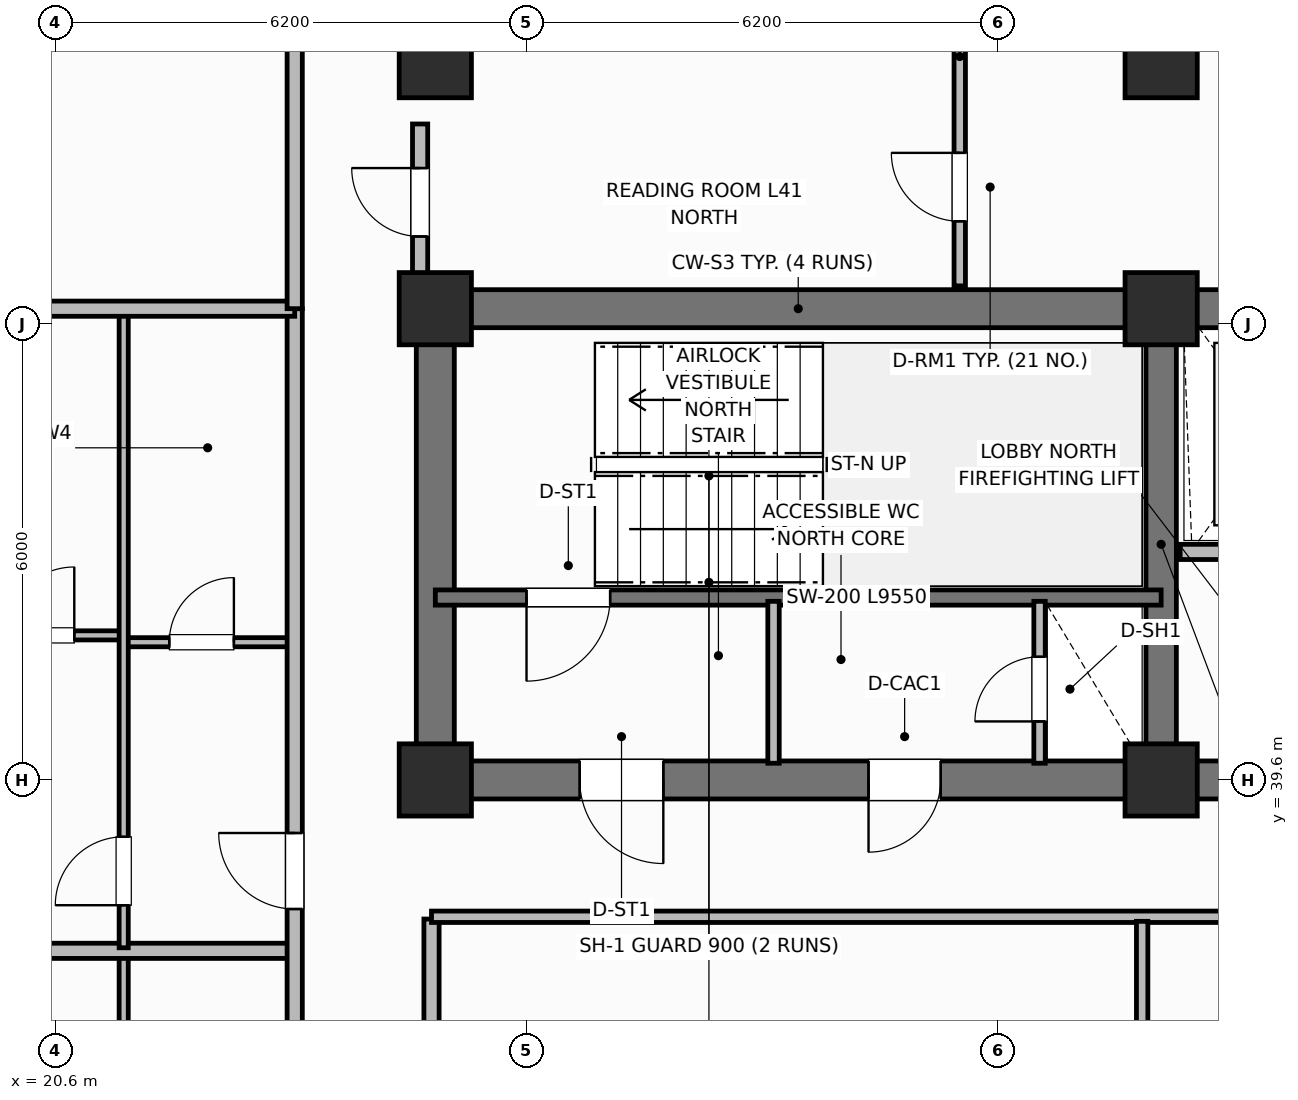
"""IFC4 building model, lengths in metres.
Left out: names, types, materials, properties, quantities, classifications, styles, units other than length and angle.
Written with IfcOpenShell. Run it as: python <this file> out.ifc"""

import sys

from ifc_helpers import new_model, si_unit, direction, frame, frame_2d, origin, origin_2d, place, context, subcontext, project, spatial, rectangle, extrude, element, fill, save


model = new_model("IFC4")
c1 = context("Model", 3, precision=1e-05, world=origin(), true_north=direction((0.0, 1.0)))
c2 = subcontext(c1, "Body", "Model", "MODEL_VIEW")
j1 = project(units=[si_unit("LENGTHUNIT", "METRE"), si_unit("PLANEANGLEUNIT", "RADIAN")], contexts=[c1])
p1 = place(None, origin())
s1 = spatial("IfcSite", under=j1, at=p1, CompositionType="ELEMENT")
p2 = place(p1, origin())
s2 = spatial("IfcBuilding", under=s1, at=p2, CompositionType="ELEMENT")
p3 = place(p2, frame((0.0, 0.0, 166.3)))
s3 = spatial("IfcBuildingStorey", under=s2, at=p3, CompositionType="ELEMENT", Elevation=166.3)
p4 = place(p3, frame((25.6, 45.8, 0.0), z_axis=(0.0, 0.0, 1.0), x_axis=(1.0, 0.0, 0.0)))
e1 = element("IfcWall", 1, at=p4, inside=s3, PredefinedType="SHEAR", context=c2, shape_type="SweptSolid", body=[
    extrude(rectangle(XDim=27.2, YDim=0.5, at=frame_2d((13.6, 0.0))), origin(), (0.0, 0.0, 1.0), 3.7),
])
p5 = place(p3, frame((25.6, 39.85, 0.0), z_axis=(0.0, 0.0, 1.0), x_axis=(0.0, 1.0, 0.0)))
e2 = element("IfcWall", 2, at=p5, inside=s3, PredefinedType="SHEAR", context=c2, shape_type="SweptSolid", body=[
    extrude(rectangle(XDim=5.7, YDim=0.5, at=frame_2d((2.85, 0.0))), origin(), (0.0, 0.0, 1.0), 3.7),
])
p6 = place(p3, frame((52.8, 39.6, 0.0), z_axis=(0.0, 0.0, 1.0), x_axis=(-1.0, 0.0, 0.0)))
e3 = element("IfcWall", 3, at=p6, inside=s3, PredefinedType="SHEAR", context=c2, shape_type="SweptSolid", body=[
    extrude(rectangle(XDim=27.2, YDim=0.5, at=frame_2d((13.6, 0.0))), origin(), (0.0, 0.0, 1.0), 3.7),
])
p7 = place(p6, frame((24.2, 0.0, 0.0)))
e4 = element("IfcOpeningElement", 4, at=p7, cuts=e3, PredefinedType="OPENING", context=c2, shape_type="SweptSolid", body=[
    extrude(rectangle(XDim=1.1, YDim=2.15, at=frame_2d((0.55, 1.075))), frame((0.0, 0.26, 0.0), z_axis=(0.0, -1.0, 0.0), x_axis=(1.0, 0.0, 0.0)), (0.0, 0.0, 1.0), 0.52),
])
p8 = place(p6, frame((20.55, 0.0, 0.0)))
e5 = element("IfcOpeningElement", 5, at=p8, cuts=e3, PredefinedType="OPENING", context=c2, shape_type="SweptSolid", body=[
    extrude(rectangle(XDim=0.95, YDim=2.1, at=frame_2d((0.475, 1.05))), frame((0.0, 0.26, 0.0), z_axis=(0.0, -1.0, 0.0), x_axis=(1.0, 0.0, 0.0)), (0.0, 0.0, 1.0), 0.52),
])
p9 = place(p6, frame((15.1, 0.0, 0.0)))
e6 = element("IfcOpeningElement", 6, at=p9, cuts=e3, PredefinedType="OPENING", context=c2, shape_type="SweptSolid", body=[
    extrude(rectangle(XDim=1.2, YDim=2.15, at=frame_2d((0.6, 1.075))), frame((0.0, 0.26, 0.0), z_axis=(0.0, -1.0, 0.0), x_axis=(1.0, 0.0, 0.0)), (0.0, 0.0, 1.0), 0.52),
])
p10 = place(p6, frame((13.05, 0.0, 0.0)))
e7 = element("IfcOpeningElement", 7, at=p10, cuts=e3, PredefinedType="OPENING", context=c2, shape_type="SweptSolid", body=[
    extrude(rectangle(XDim=0.85, YDim=2.1, at=frame_2d((0.425, 1.05))), frame((0.0, 0.26, 0.0), z_axis=(0.0, -1.0, 0.0), x_axis=(1.0, 0.0, 0.0)), (0.0, 0.0, 1.0), 0.52),
])
p11 = place(p6, frame((11.0, 0.0, 0.0)))
e8 = element("IfcOpeningElement", 8, at=p11, cuts=e3, PredefinedType="OPENING", context=c2, shape_type="SweptSolid", body=[
    extrude(rectangle(XDim=0.85, YDim=2.1, at=frame_2d((0.425, 1.05))), frame((0.0, 0.26, 0.0), z_axis=(0.0, -1.0, 0.0), x_axis=(1.0, 0.0, 0.0)), (0.0, 0.0, 1.0), 0.52),
])
p12 = place(p6, frame((7.35, 0.0, 0.0)))
e9 = element("IfcOpeningElement", 9, at=p12, cuts=e3, PredefinedType="OPENING", context=c2, shape_type="SweptSolid", body=[
    extrude(rectangle(XDim=0.85, YDim=2.1, at=frame_2d((0.425, 1.05))), frame((0.0, 0.26, 0.0), z_axis=(0.0, -1.0, 0.0), x_axis=(1.0, 0.0, 0.0)), (0.0, 0.0, 1.0), 0.52),
])
p13 = place(p6, frame((4.8, 0.0, 0.0)))
e10 = element("IfcOpeningElement", 10, at=p13, cuts=e3, PredefinedType="OPENING", context=c2, shape_type="SweptSolid", body=[
    extrude(rectangle(XDim=0.85, YDim=2.1, at=frame_2d((0.425, 1.05))), frame((0.0, 0.26, 0.0), z_axis=(0.0, -1.0, 0.0), x_axis=(1.0, 0.0, 0.0)), (0.0, 0.0, 1.0), 0.52),
])
p14 = place(p6, frame((1.9, 0.0, 0.0)))
e11 = element("IfcOpeningElement", 11, at=p14, cuts=e3, PredefinedType="OPENING", context=c2, shape_type="SweptSolid", body=[
    extrude(rectangle(XDim=0.85, YDim=2.1, at=frame_2d((0.425, 1.05))), frame((0.0, 0.26, 0.0), z_axis=(0.0, -1.0, 0.0), x_axis=(1.0, 0.0, 0.0)), (0.0, 0.0, 1.0), 0.52),
])
p15 = place(p3, frame((35.15, 39.85, 0.0), z_axis=(0.0, 0.0, 1.0), x_axis=(0.0, 1.0, 0.0)))
e12 = element("IfcWall", 12, at=p15, inside=s3, PredefinedType="SHEAR", context=c2, shape_type="SweptSolid", body=[
    extrude(rectangle(XDim=5.7, YDim=0.4, at=frame_2d((2.85, 0.0))), origin(), (0.0, 0.0, 1.0), 3.7),
])
for number, where, z_axis, x_axis in (
    (13, (25.6, 39.6, 0.0), (0.0, 0.0, 1.0), (1.0, 0.0, 0.0)),
    (14, (25.6, 45.8, 0.0), (0.0, 0.0, 1.0), (1.0, 0.0, 0.0)),
    (15, (35.15, 39.6, 0.0), (0.0, 0.0, 1.0), (1.0, 0.0, 0.0)),
    (16, (35.15, 45.8, 0.0), (0.0, 0.0, 1.0), (1.0, 0.0, 0.0)),
    (17, (25.6, 49.05, 0.0), (0.0, 0.0, 1.0), (1.0, 0.0, 0.0)),
    (18, (35.15, 49.05, 0.0), (0.0, 0.0, 1.0), (1.0, 0.0, 0.0)),
):
    element("IfcColumn", number, at=place(p3, frame(where, z_axis=z_axis, x_axis=x_axis)), inside=s3, PredefinedType="COLUMN", context=c2, shape_type="SweptSolid", body=[
        extrude(rectangle(XDim=0.95, YDim=0.95, at=origin_2d()), origin(), (0.0, 0.0, 1.0), 3.7),
    ])
p16 = place(p3, frame((35.15, 42.0, 0.0), z_axis=(0.0, 0.0, 1.0), x_axis=(-1.0, 0.0, 0.0)))
e19 = element("IfcWall", 19, at=p16, inside=s3, PredefinedType="SHEAR", context=c2, shape_type="SweptSolid", body=[
    extrude(rectangle(XDim=9.55, YDim=0.2, at=frame_2d((4.775, 0.0))), origin(), (0.0, 0.0, 1.0), 3.7),
])
p17 = place(p16, frame((7.25, 0.0, 0.0)))
e20 = element("IfcOpeningElement", 20, at=p17, cuts=e19, PredefinedType="OPENING", context=c2, shape_type="SweptSolid", body=[
    extrude(rectangle(XDim=1.1, YDim=2.15, at=frame_2d((0.55, 1.075))), frame((0.0, 0.11, 0.0), z_axis=(0.0, -1.0, 0.0), x_axis=(1.0, 0.0, 0.0)), (0.0, 0.0, 1.0), 0.22),
])
p18 = place(p3, frame((33.55, 39.82, 0.0), z_axis=(0.0, 0.0, 1.0), x_axis=(0.0, 1.0, 0.0)))
e21 = element("IfcWall", 21, at=p18, inside=s3, PredefinedType="PARTITIONING", context=c2, shape_type="SweptSolid", body=[
    extrude(rectangle(XDim=2.13, YDim=0.15, at=frame_2d((1.065, 0.0))), origin(), (0.0, 0.0, 1.0), 2.55),
])
p19 = place(p18, frame((0.55, 0.0, 0.0)))
e22 = element("IfcOpeningElement", 22, at=p19, cuts=e21, PredefinedType="OPENING", context=c2, shape_type="SweptSolid", body=[
    extrude(rectangle(XDim=0.85, YDim=2.05, at=frame_2d((0.425, 1.025))), frame((0.0, 0.085, 0.0), z_axis=(0.0, -1.0, 0.0), x_axis=(1.0, 0.0, 0.0)), (0.0, 0.0, 1.0), 0.17),
])
p20 = place(p3, frame((30.05, 39.82, 0.0), z_axis=(0.0, 0.0, 1.0), x_axis=(0.0, 1.0, 0.0)))
e23 = element("IfcWall", 23, at=p20, inside=s3, PredefinedType="PARTITIONING", context=c2, shape_type="SweptSolid", body=[
    extrude(rectangle(XDim=2.13, YDim=0.15, at=frame_2d((1.065, 0.0))), origin(), (0.0, 0.0, 1.0), 2.55),
])
p21 = place(p3, frame((37.95, 42.6, 0.0), z_axis=(0.0, 0.0, 1.0), x_axis=(-1.0, 0.0, 0.0)))
e24 = element("IfcWall", 24, at=p21, inside=s3, PredefinedType="PARTITIONING", context=c2, shape_type="SweptSolid", body=[
    extrude(rectangle(XDim=2.55, YDim=0.2, at=frame_2d((1.275, 0.0))), origin(), (0.0, 0.0, 1.0), 2.32),
])
p22 = place(p21, frame((0.75, 0.0, 0.0)))
e25 = element("IfcOpeningElement", 25, at=p22, cuts=e24, PredefinedType="OPENING", context=c2, shape_type="SweptSolid", body=[
    extrude(rectangle(XDim=1.1, YDim=2.15, at=frame_2d((0.55, 1.075))), frame((0.0, 0.11, 0.0), z_axis=(0.0, -1.0, 0.0), x_axis=(1.0, 0.0, 0.0)), (0.0, 0.0, 1.0), 0.22),
])
p23 = place(p3, frame((25.55, 18.63, 0.0), z_axis=(0.0, 0.0, 1.0), x_axis=(0.0, 1.0, 0.0)))
e26 = element("IfcWall", 26, at=p23, inside=s3, PredefinedType="PARTITIONING", context=c2, shape_type="SweptSolid", body=[
    extrude(rectangle(XDim=19.14, YDim=0.2, at=frame_2d((9.57, 0.0))), origin(), (0.0, 0.0, 1.0), 2.55),
])
p24 = place(p3, frame((25.55, 37.8, 0.0), z_axis=(0.0, 0.0, 1.0), x_axis=(1.0, 0.0, 0.0)))
e27 = element("IfcWall", 27, at=p24, inside=s3, PredefinedType="PARTITIONING", context=c2, shape_type="SweptSolid", body=[
    extrude(rectangle(XDim=22.2, YDim=0.15, at=frame_2d((11.1, 0.0))), origin(), (0.0, 0.0, 1.0), 2.55),
])
p25 = place(p3, frame((34.9, 18.66, 0.0), z_axis=(0.0, 0.0, 1.0), x_axis=(0.0, 1.0, 0.0)))
e28 = element("IfcWall", 28, at=p25, inside=s3, PredefinedType="PARTITIONING", context=c2, shape_type="SweptSolid", body=[
    extrude(rectangle(XDim=19.08, YDim=0.15, at=frame_2d((9.54, 0.0))), origin(), (0.0, 0.0, 1.0), 2.55),
])
p26 = place(p25, frame((5.0, 0.0, 0.0)))
e29 = element("IfcOpeningElement", 29, at=p26, cuts=e28, PredefinedType="OPENING", context=c2, shape_type="SweptSolid", body=[
    extrude(rectangle(XDim=1.0, YDim=2.15, at=frame_2d((0.5, 1.075))), frame((0.0, 0.085, 0.0), z_axis=(0.0, -1.0, 0.0), x_axis=(1.0, 0.0, 0.0)), (0.0, 0.0, 1.0), 0.17),
])
p27 = place(p3, frame((21.5, 29.84, 0.0), z_axis=(0.0, 0.0, 1.0), x_axis=(0.0, 1.0, 0.0)))
e30 = element("IfcWall", 30, at=p27, inside=s3, PredefinedType="PARTITIONING", context=c2, shape_type="SweptSolid", body=[
    extrude(rectangle(XDim=7.472, YDim=0.12, at=frame_2d((3.736, 0.0))), origin(), (0.0, 0.0, 1.0), 2.55),
])
p28 = place(p27, frame((0.61, 0.0, 0.0)))
e31 = element("IfcOpeningElement", 31, at=p28, cuts=e30, PredefinedType="OPENING", context=c2, shape_type="SweptSolid", body=[
    extrude(rectangle(XDim=0.9, YDim=2.1, at=frame_2d((0.45, 1.05))), frame((0.0, 0.07, 0.0), z_axis=(0.0, -1.0, 0.0), x_axis=(1.0, 0.0, 0.0)), (0.0, 0.0, 1.0), 0.14),
])
p29 = place(p3, frame((16.57, 37.352, 0.0), z_axis=(0.0, 0.0, 1.0), x_axis=(1.0, 0.0, 0.0)))
e32 = element("IfcWall", 32, at=p29, inside=s3, PredefinedType="PARTITIONING", context=c2, shape_type="SweptSolid", body=[
    extrude(rectangle(XDim=7.18, YDim=0.2, at=frame_2d((3.59, 0.0))), origin(), (0.0, 0.0, 1.0), 2.55),
])
p30 = place(p3, frame((21.5, 41.412, 0.0), z_axis=(0.0, 0.0, 1.0), x_axis=(1.0, 0.0, 0.0)))
e33 = element("IfcWall", 33, at=p30, inside=s3, PredefinedType="PARTITIONING", context=c2, shape_type="SweptSolid", body=[
    extrude(rectangle(XDim=2.25, YDim=0.12, at=frame_2d((1.125, 0.0))), origin(), (0.0, 0.0, 1.0), 2.55),
])
p31 = place(p30, frame((0.6, 0.0, 0.0)))
e34 = element("IfcOpeningElement", 34, at=p31, cuts=e33, PredefinedType="OPENING", context=c2, shape_type="SweptSolid", body=[
    extrude(rectangle(XDim=0.85, YDim=2.1, at=frame_2d((0.425, 1.05))), frame((0.0, 0.07, 0.0), z_axis=(0.0, -1.0, 0.0), x_axis=(1.0, 0.0, 0.0)), (0.0, 0.0, 1.0), 0.14),
])
p32 = place(p3, frame((16.57, 41.502, 0.0), z_axis=(0.0, 0.0, 1.0), x_axis=(1.0, 0.0, 0.0)))
e35 = element("IfcWall", 35, at=p32, inside=s3, PredefinedType="PARTITIONING", context=c2, shape_type="SweptSolid", body=[
    extrude(rectangle(XDim=4.93, YDim=0.12, at=frame_2d((2.465, 0.0))), origin(), (0.0, 0.0, 1.0), 2.55),
])
p33 = place(p32, frame((3.38, 0.0, 0.0)))
e36 = element("IfcOpeningElement", 36, at=p33, cuts=e35, PredefinedType="OPENING", context=c2, shape_type="SweptSolid", body=[
    extrude(rectangle(XDim=0.9, YDim=2.1, at=frame_2d((0.45, 1.05))), frame((0.0, 0.07, 0.0), z_axis=(0.0, -1.0, 0.0), x_axis=(1.0, 0.0, 0.0)), (0.0, 0.0, 1.0), 0.14),
])
p34 = place(p3, frame((21.5, 37.392, 0.0), z_axis=(0.0, 0.0, 1.0), x_axis=(0.0, 1.0, 0.0)))
e37 = element("IfcWall", 37, at=p34, inside=s3, PredefinedType="PARTITIONING", context=c2, shape_type="SweptSolid", body=[
    extrude(rectangle(XDim=8.368, YDim=0.12, at=frame_2d((4.184, 0.0))), origin(), (0.0, 0.0, 1.0), 2.55),
])
p35 = place(p34, frame((0.56, 0.0, 0.0)))
e38 = element("IfcOpeningElement", 38, at=p35, cuts=e37, PredefinedType="OPENING", context=c2, shape_type="SweptSolid", body=[
    extrude(rectangle(XDim=0.9, YDim=2.1, at=frame_2d((0.45, 1.05))), frame((0.0, 0.07, 0.0), z_axis=(0.0, -1.0, 0.0), x_axis=(1.0, 0.0, 0.0)), (0.0, 0.0, 1.0), 0.14),
])
p36 = place(p3, frame((23.75, 10.6, 0.0), z_axis=(0.0, 0.0, 1.0), x_axis=(0.0, 1.0, 0.0)))
e39 = element("IfcWall", 39, at=p36, inside=s3, PredefinedType="PARTITIONING", context=c2, shape_type="SweptSolid", body=[
    extrude(rectangle(XDim=35.2, YDim=0.2, at=frame_2d((17.6, 0.0))), origin(), (0.0, 0.0, 1.0), 2.55),
])
p37 = place(p36, frame((2.65, 0.0, 0.0)))
e40 = element("IfcOpeningElement", 40, at=p37, cuts=e39, PredefinedType="OPENING", context=c2, shape_type="SweptSolid", body=[
    extrude(rectangle(XDim=1.0, YDim=2.15, at=frame_2d((0.5, 1.075))), frame((0.0, 0.11, 0.0), z_axis=(0.0, -1.0, 0.0), x_axis=(1.0, 0.0, 0.0)), (0.0, 0.0, 1.0), 0.22),
])
p38 = place(p36, frame((11.4, 0.0, 0.0)))
e41 = element("IfcOpeningElement", 41, at=p38, cuts=e39, PredefinedType="OPENING", context=c2, shape_type="SweptSolid", body=[
    extrude(rectangle(XDim=1.0, YDim=2.15, at=frame_2d((0.5, 1.075))), frame((0.0, 0.11, 0.0), z_axis=(0.0, -1.0, 0.0), x_axis=(1.0, 0.0, 0.0)), (0.0, 0.0, 1.0), 0.22),
])
p39 = place(p36, frame((21.37, 0.0, 0.0)))
e42 = element("IfcOpeningElement", 42, at=p39, cuts=e39, PredefinedType="OPENING", context=c2, shape_type="SweptSolid", body=[
    extrude(rectangle(XDim=1.0, YDim=2.15, at=frame_2d((0.5, 1.075))), frame((0.0, 0.11, 0.0), z_axis=(0.0, -1.0, 0.0), x_axis=(1.0, 0.0, 0.0)), (0.0, 0.0, 1.0), 0.22),
])
p40 = place(p36, frame((27.302, 0.0, 0.0)))
e43 = element("IfcOpeningElement", 43, at=p40, cuts=e39, PredefinedType="OPENING", context=c2, shape_type="SweptSolid", body=[
    extrude(rectangle(XDim=1.0, YDim=2.15, at=frame_2d((0.5, 1.075))), frame((0.0, 0.11, 0.0), z_axis=(0.0, -1.0, 0.0), x_axis=(1.0, 0.0, 0.0)), (0.0, 0.0, 1.0), 0.22),
])
p41 = place(p3, frame((16.99, 45.8, 0.0), z_axis=(0.0, 0.0, 1.0), x_axis=(1.0, 0.0, 0.0)))
e44 = element("IfcWall", 44, at=p41, inside=s3, PredefinedType="PARTITIONING", context=c2, shape_type="SweptSolid", body=[
    extrude(rectangle(XDim=6.76, YDim=0.2, at=frame_2d((3.38, 0.0))), origin(), (0.0, 0.0, 1.0), 2.55),
])
p42 = place(p3, frame((23.75, 45.8, 0.0), z_axis=(0.0, 0.0, 1.0), x_axis=(0.0, 1.0, 0.0)))
e45 = element("IfcWall", 45, at=p42, inside=s3, PredefinedType="PARTITIONING", context=c2, shape_type="SweptSolid", body=[
    extrude(rectangle(XDim=3.73, YDim=0.2, at=frame_2d((1.865, 0.0))), origin(), (0.0, 0.0, 1.0), 2.55),
])
p43 = place(p3, frame((32.5, 46.1, 0.0), z_axis=(0.0, 0.0, 1.0), x_axis=(0.0, 1.0, 0.0)))
e46 = element("IfcWall", 46, at=p43, inside=s3, PredefinedType="PARTITIONING", context=c2, shape_type="SweptSolid", body=[
    extrude(rectangle(XDim=3.43, YDim=0.15, at=frame_2d((1.715, 0.0))), origin(), (0.0, 0.0, 1.0), 2.55),
])
p44 = place(p43, frame((0.85, 0.0, 0.0)))
e47 = element("IfcOpeningElement", 47, at=p44, cuts=e46, PredefinedType="OPENING", context=c2, shape_type="SweptSolid", body=[
    extrude(rectangle(XDim=0.9, YDim=2.1, at=frame_2d((0.45, 1.05))), frame((0.0, 0.085, 0.0), z_axis=(0.0, -1.0, 0.0), x_axis=(1.0, 0.0, 0.0)), (0.0, 0.0, 1.0), 0.17),
])
p45 = place(p3, frame((25.4, 46.1, 0.0), z_axis=(0.0, 0.0, 1.0), x_axis=(0.0, 1.0, 0.0)))
e48 = element("IfcWall", 48, at=p45, inside=s3, PredefinedType="PARTITIONING", context=c2, shape_type="SweptSolid", body=[
    extrude(rectangle(XDim=2.13, YDim=0.2, at=frame_2d((1.065, 0.0))), origin(), (0.0, 0.0, 1.0), 2.55),
])
p46 = place(p45, frame((0.65, 0.0, 0.0)))
e49 = element("IfcOpeningElement", 49, at=p46, cuts=e48, PredefinedType="OPENING", context=c2, shape_type="SweptSolid", body=[
    extrude(rectangle(XDim=0.9, YDim=2.1, at=frame_2d((0.45, 1.05))), frame((0.0, 0.11, 0.0), z_axis=(0.0, -1.0, 0.0), x_axis=(1.0, 0.0, 0.0)), (0.0, 0.0, 1.0), 0.22),
])
p47 = place(p17, origin())
e50 = element("IfcDoor", 50, at=p47, inside=s3, OperationType="SINGLE_SWING_RIGHT", PredefinedType="DOOR", context=c2, shape_type="SweptSolid", body=[
    extrude(rectangle(XDim=1.1, YDim=2.15, at=frame_2d((0.55, 1.075))), frame((0.0, 0.025, 0.0), z_axis=(0.0, -1.0, 0.0), x_axis=(1.0, 0.0, 0.0)), (0.0, 0.0, 1.0), 0.05),
])
fill(e20, e50)
p48 = place(p19, origin())
e51 = element("IfcDoor", 51, at=p48, inside=s3, OperationType="SINGLE_SWING_LEFT", PredefinedType="TRAPDOOR", context=c2, shape_type="SweptSolid", body=[
    extrude(rectangle(XDim=0.85, YDim=2.05, at=frame_2d((0.425, 1.025))), frame((0.0, 0.025, 0.0), z_axis=(0.0, -1.0, 0.0), x_axis=(1.0, 0.0, 0.0)), (0.0, 0.0, 1.0), 0.05),
])
fill(e22, e51)
p49 = place(p31, origin())
e52 = element("IfcDoor", 52, at=p49, inside=s3, OperationType="SINGLE_SWING_RIGHT", PredefinedType="DOOR", context=c2, shape_type="SweptSolid", body=[
    extrude(rectangle(XDim=0.85, YDim=2.1, at=frame_2d((0.425, 1.05))), frame((0.0, 0.025, 0.0), z_axis=(0.0, -1.0, 0.0), x_axis=(1.0, 0.0, 0.0)), (0.0, 0.0, 1.0), 0.05),
])
fill(e34, e52)
p50 = place(p33, origin())
e53 = element("IfcDoor", 53, at=p50, inside=s3, OperationType="SINGLE_SWING_RIGHT", PredefinedType="DOOR", context=c2, shape_type="SweptSolid", body=[
    extrude(rectangle(XDim=0.9, YDim=2.1, at=frame_2d((0.45, 1.05))), frame((0.0, 0.025, 0.0), z_axis=(0.0, -1.0, 0.0), x_axis=(1.0, 0.0, 0.0)), (0.0, 0.0, 1.0), 0.05),
])
fill(e36, e53)
p51 = place(p35, origin())
e54 = element("IfcDoor", 54, at=p51, inside=s3, OperationType="SINGLE_SWING_LEFT", PredefinedType="DOOR", context=c2, shape_type="SweptSolid", body=[
    extrude(rectangle(XDim=0.9, YDim=2.1, at=frame_2d((0.45, 1.05))), frame((0.0, 0.025, 0.0), z_axis=(0.0, -1.0, 0.0), x_axis=(1.0, 0.0, 0.0)), (0.0, 0.0, 1.0), 0.05),
])
fill(e38, e54)
p52 = place(p40, origin())
e55 = element("IfcDoor", 55, at=p52, inside=s3, OperationType="SINGLE_SWING_RIGHT", PredefinedType="DOOR", context=c2, shape_type="SweptSolid", body=[
    extrude(rectangle(XDim=1.0, YDim=2.15, at=frame_2d((0.5, 1.075))), frame((0.0, 0.025, 0.0), z_axis=(0.0, -1.0, 0.0), x_axis=(1.0, 0.0, 0.0)), (0.0, 0.0, 1.0), 0.05),
])
fill(e43, e55)
p53 = place(p44, origin())
e56 = element("IfcDoor", 56, at=p53, inside=s3, OperationType="SINGLE_SWING_RIGHT", PredefinedType="DOOR", context=c2, shape_type="SweptSolid", body=[
    extrude(rectangle(XDim=0.9, YDim=2.1, at=frame_2d((0.45, 1.05))), frame((0.0, 0.025, 0.0), z_axis=(0.0, -1.0, 0.0), x_axis=(1.0, 0.0, 0.0)), (0.0, 0.0, 1.0), 0.05),
])
fill(e47, e56)
p54 = place(p46, origin())
e57 = element("IfcDoor", 57, at=p54, inside=s3, OperationType="SINGLE_SWING_RIGHT", PredefinedType="DOOR", context=c2, shape_type="SweptSolid", body=[
    extrude(rectangle(XDim=0.9, YDim=2.1, at=frame_2d((0.45, 1.05))), frame((0.0, 0.025, 0.0), z_axis=(0.0, -1.0, 0.0), x_axis=(1.0, 0.0, 0.0)), (0.0, 0.0, 1.0), 0.05),
])
fill(e49, e57)
p55 = place(p7, origin())
e58 = element("IfcDoor", 58, at=p55, inside=s3, OperationType="SINGLE_SWING_LEFT", PredefinedType="DOOR", context=c2, shape_type="SweptSolid", body=[
    extrude(rectangle(XDim=1.1, YDim=2.15, at=frame_2d((0.55, 1.075))), frame((0.0, 0.025, 0.0), z_axis=(0.0, -1.0, 0.0), x_axis=(1.0, 0.0, 0.0)), (0.0, 0.0, 1.0), 0.05),
])
fill(e4, e58)
p56 = place(p8, origin())
e59 = element("IfcDoor", 59, at=p56, inside=s3, OperationType="SINGLE_SWING_RIGHT", PredefinedType="DOOR", context=c2, shape_type="SweptSolid", body=[
    extrude(rectangle(XDim=0.95, YDim=2.1, at=frame_2d((0.475, 1.05))), frame((0.0, 0.025, 0.0), z_axis=(0.0, -1.0, 0.0), x_axis=(1.0, 0.0, 0.0)), (0.0, 0.0, 1.0), 0.05),
])
fill(e5, e59)
save(model, sys.argv[1])
